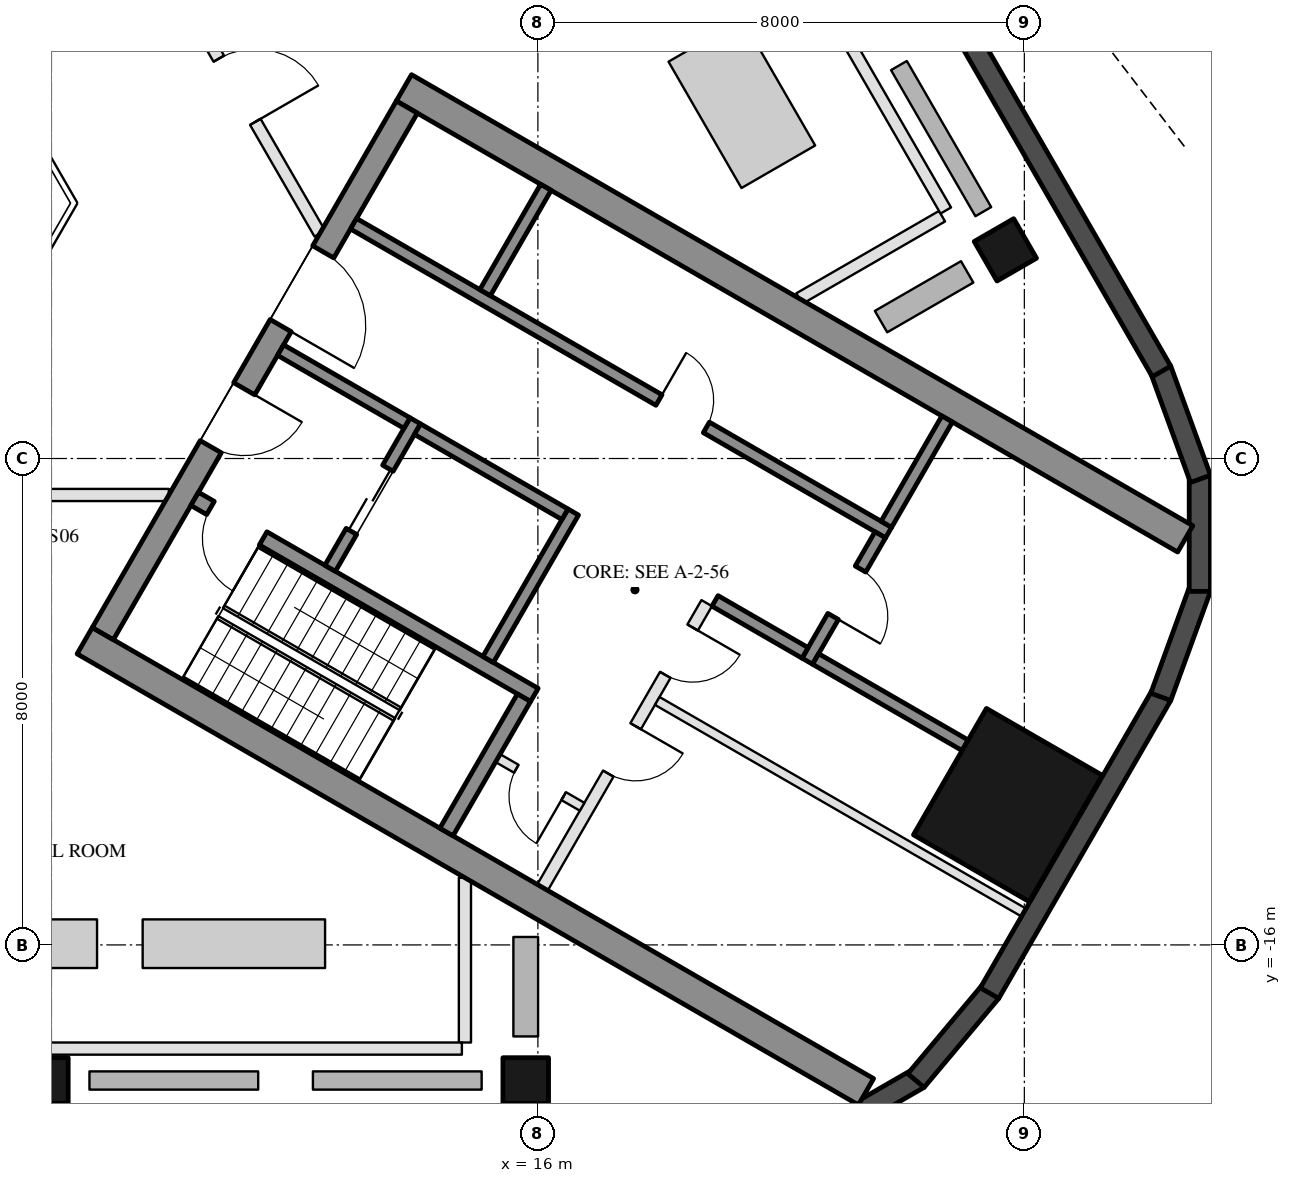
"""IFC4 building model, lengths in metres.
Left out: names, types, materials, properties, quantities, classifications, styles, units other than length and angle.
Written with IfcOpenShell. Run it as: python <this file> out.ifc"""

import sys

from ifc_helpers import new_model, si_unit, direction, frame, frame_2d, origin, origin_2d, place, context, subcontext, project, spatial, rectangle, hollow_rectangle, extrude, element, fill, save


model = new_model("IFC4")
c1 = context("Model", 3, precision=1e-05, world=origin(), true_north=direction((0.0, 1.0)))
c2 = subcontext(c1, "Body", "Model", "MODEL_VIEW")
j1 = project(units=[si_unit("LENGTHUNIT", "METRE"), si_unit("PLANEANGLEUNIT", "RADIAN")], contexts=[c1])
p1 = place(None, origin())
s1 = spatial("IfcSite", under=j1, at=p1, CompositionType="ELEMENT")
p2 = place(p1, origin())
s2 = spatial("IfcBuilding", under=s1, at=p2, CompositionType="ELEMENT")
p3 = place(p2, frame((0.0, 0.0, 242.2)))
s3 = spatial("IfcBuildingStorey", under=s2, at=p3, CompositionType="ELEMENT", Elevation=242.2)
for number, where, z_axis, x_axis in (
    (1, (7.9, -18.23, 0.0), (0.0, 0.0, 1.0), (-1.0, 0.0, 0.0)),
    (2, (15.8, -18.23, 0.0), (0.0, 0.0, 1.0), (-1.0, 0.0, 0.0)),
    (3, (23.688, -4.568, 0.0), (0.0, 0.0, 1.0), (-0.5, 0.866, 0.0)),
):
    element("IfcColumn", number, at=place(p3, frame(where, z_axis=z_axis, x_axis=x_axis)), inside=s3, PredefinedType="COLUMN", context=c2, shape_type="SweptSolid", body=[
        extrude(hollow_rectangle(XDim=0.75, YDim=0.75, WallThickness=0.035, at=origin_2d()), origin(), (0.0, 0.0, 1.0), 4.5),
    ])
p4 = place(p3, frame((23.729, -13.7, 0.0), z_axis=(0.0, 0.0, 1.0), x_axis=(0.5, 0.866025403784, 0.0)))
e4 = element("IfcColumn", 4, at=p4, inside=s3, PredefinedType="COLUMN", context=c2, shape_type="SweptSolid", body=[
    extrude(hollow_rectangle(XDim=2.4, YDim=2.2, WallThickness=0.06, at=origin_2d()), origin(), (0.0, 0.0, 1.0), 4.5),
])
for number, where, z_axis, x_axis in (
    (5, (20.61, -19.147, 0.0), (0.0, 0.0, 1.0), (0.866, 0.5, 0.0)),
    (6, (22.217, -18.231, 0.0), (0.0, 0.0, 1.0), (0.643, 0.766, 0.0)),
):
    element("IfcWall", number, at=place(p3, frame(where, z_axis=z_axis, x_axis=x_axis)), inside=s3, PredefinedType="SOLIDWALL", context=c2, shape_type="SweptSolid", body=[
        extrude(rectangle(XDim=1.91, YDim=0.35, at=frame_2d((0.955, 0.0))), origin(), (0.0, 0.0, 1.0), 4.35),
    ])
p5 = place(p3, frame((23.427, -16.792, 0.0), z_axis=(0.0, 0.0, 1.0), x_axis=(0.499986410639, 0.866033249463, 0.0)))
e7 = element("IfcWall", 7, at=p5, inside=s3, PredefinedType="SOLIDWALL", context=c2, shape_type="SweptSolid", body=[
    extrude(rectangle(XDim=5.658, YDim=0.35, at=frame_2d((2.829, 0.0))), origin(), (0.0, 0.0, 1.0), 4.35),
])
for number, where, z_axis, x_axis in (
    (8, (26.244, -11.92, 0.0), (0.0, 0.0, 1.0), (0.342, 0.94, 0.0)),
    (9, (26.886, -10.185, 0.0), (0.0, 0.0, 1.0), (0.0, 1.0, 0.0)),
    (10, (26.897, -8.335, 0.0), (0.0, 0.0, 1.0), (-0.342, 0.94, 0.0)),
):
    element("IfcWall", number, at=place(p3, frame(where, z_axis=z_axis, x_axis=x_axis)), inside=s3, PredefinedType="SOLIDWALL", context=c2, shape_type="SweptSolid", body=[
        extrude(rectangle(XDim=1.91, YDim=0.35, at=frame_2d((0.955, 0.0))), origin(), (0.0, 0.0, 1.0), 4.35),
    ])
p6 = place(p3, frame((26.256, -6.567, 0.0), z_axis=(0.0, 0.0, 1.0), x_axis=(-0.499998380999, 0.866026338513, 0.0)))
e11 = element("IfcWall", 11, at=p6, inside=s3, PredefinedType="SOLIDWALL", context=c2, shape_type="SweptSolid", body=[
    extrude(rectangle(XDim=37.631, YDim=0.35, at=frame_2d((18.816, 0.0))), origin(), (0.0, 0.0, 1.0), 4.35),
])
for number, where, z_axis, x_axis in (
    (12, (8.547, -10.997, 0.0), (0.0, 0.0, 1.0), (0.866, -0.5, 0.0)),
    (13, (13.797, -1.903, 0.0), (0.0, 0.0, 1.0), (0.866, -0.5, 0.0)),
):
    element("IfcWall", number, at=place(p3, frame(where, z_axis=z_axis, x_axis=x_axis)), inside=s3, PredefinedType="SHEAR", context=c2, shape_type="SweptSolid", body=[
        extrude(rectangle(XDim=14.837, YDim=0.5, at=frame_2d((7.418, 0.0))), origin(), (0.0, 0.0, 1.0), 4.3),
    ])
p7 = place(p3, frame((8.845, -10.88, 0.0), z_axis=(0.0, 0.0, 1.0), x_axis=(0.500004234368, 0.866022959057, 0.0)))
e14 = element("IfcWall", 14, at=p7, inside=s3, PredefinedType="SHEAR", context=c2, shape_type="SweptSolid", body=[
    extrude(rectangle(XDim=10.0, YDim=0.4, at=frame_2d((5.0, 0.0))), origin(), (0.0, 0.0, 1.0), 4.3),
])
p8 = place(p7, frame((3.55, 0.0, 0.0)))
e15 = element("IfcOpeningElement", 15, at=p8, cuts=e14, PredefinedType="OPENING", context=c2, shape_type="SweptSolid", body=[
    extrude(rectangle(XDim=1.1, YDim=2.1, at=frame_2d((0.55, 1.05))), frame((0.0, 0.21, 0.0), z_axis=(0.0, -1.0, 0.0), x_axis=(1.0, 0.0, 0.0)), (0.0, 0.0, 1.0), 0.42),
])
p9 = place(p7, frame((5.85, 0.0, 0.0)))
e16 = element("IfcOpeningElement", 16, at=p9, cuts=e14, PredefinedType="OPENING", context=c2, shape_type="SweptSolid", body=[
    extrude(rectangle(XDim=1.4, YDim=2.1, at=frame_2d((0.7, 1.05))), frame((0.0, 0.21, 0.0), z_axis=(0.0, -1.0, 0.0), x_axis=(1.0, 0.0, 0.0)), (0.0, 0.0, 1.0), 0.42),
])
p10 = place(p3, frame((10.356, -8.664, 0.0), z_axis=(0.0, 0.0, 1.0), x_axis=(0.866028629588, -0.499994412703, 0.0)))
e17 = element("IfcWall", 17, at=p10, inside=s3, PredefinedType="SHEAR", context=c2, shape_type="SweptSolid", body=[
    extrude(rectangle(XDim=6.45, YDim=0.25, at=frame_2d((3.225, 0.0))), origin(), (0.0, 0.0, 1.0), 4.3),
])
p11 = place(p10, frame((0.3, 0.0, 0.0)))
e18 = element("IfcOpeningElement", 18, at=p11, cuts=e17, PredefinedType="OPENING", context=c2, shape_type="SweptSolid", body=[
    extrude(rectangle(XDim=1.0, YDim=2.1, at=frame_2d((0.5, 1.05))), frame((0.0, 0.135, 0.0), z_axis=(0.0, -1.0, 0.0), x_axis=(1.0, 0.0, 0.0)), (0.0, 0.0, 1.0), 0.27),
])
p12 = place(p3, frame((14.496, -14.143, 0.0), z_axis=(0.0, 0.0, 1.0), x_axis=(0.500062241894, 0.865989465428, 0.0)))
e19 = element("IfcWall", 19, at=p12, inside=s3, PredefinedType="SHEAR", context=c2, shape_type="SweptSolid", body=[
    extrude(rectangle(XDim=2.55, YDim=0.25, at=frame_2d((1.275, 0.0))), origin(), (0.0, 0.0, 1.0), 4.3),
])
p13 = place(p3, frame((15.181, -11.305, 0.0), z_axis=(0.0, 0.0, 1.0), x_axis=(0.49994636267, 0.866056369097, 0.0)))
e20 = element("IfcWall", 20, at=p13, inside=s3, PredefinedType="SHEAR", context=c2, shape_type="SweptSolid", body=[
    extrude(rectangle(XDim=2.8, YDim=0.2, at=frame_2d((1.4, 0.0))), origin(), (0.0, 0.0, 1.0), 4.3),
])
p14 = place(p3, frame((12.583, -9.805, 0.0), z_axis=(0.0, 0.0, 1.0), x_axis=(0.49994636267, 0.866056369097, 0.0)))
e21 = element("IfcWall", 21, at=p14, inside=s3, PredefinedType="SHEAR", context=c2, shape_type="SweptSolid", body=[
    extrude(rectangle(XDim=2.8, YDim=0.2, at=frame_2d((1.4, 0.0))), origin(), (0.0, 0.0, 1.0), 4.3),
])
p15 = place(p14, frame((0.7, 0.0, 0.0)))
e22 = element("IfcOpeningElement", 22, at=p15, cuts=e21, PredefinedType="OPENING", context=c2, shape_type="SweptSolid", body=[
    extrude(rectangle(XDim=1.2, YDim=2.1, at=frame_2d((0.6, 1.05))), frame((0.0, 0.11, 0.0), z_axis=(0.0, -1.0, 0.0), x_axis=(1.0, 0.0, 0.0)), (0.0, 0.0, 1.0), 0.22),
])
p16 = place(p3, frame((11.768, -6.217, 0.0), z_axis=(0.0, 0.0, 1.0), x_axis=(0.866050077142, -0.499957262057, 0.0)))
e23 = element("IfcWall", 23, at=p16, inside=s3, PredefinedType="SHEAR", context=c2, shape_type="SweptSolid", body=[
    extrude(rectangle(XDim=2.4, YDim=0.2, at=frame_2d((1.2, 0.0))), origin(), (0.0, 0.0, 1.0), 4.3),
])
p17 = place(p3, frame((14.02, -7.517, 0.0), z_axis=(0.0, 0.0, 1.0), x_axis=(0.866034573852, -0.49998411664, 0.0)))
e24 = element("IfcWall", 24, at=p17, inside=s3, PredefinedType="SHEAR", context=c2, shape_type="SweptSolid", body=[
    extrude(rectangle(XDim=2.8, YDim=0.2, at=frame_2d((1.4, 0.0))), origin(), (0.0, 0.0, 1.0), 4.3),
])
p18 = place(p3, frame((12.968, -4.138, 0.0), z_axis=(0.0, 0.0, 1.0), x_axis=(0.866028328073, -0.49999493495, 0.0)))
e25 = element("IfcWall", 25, at=p18, inside=s3, PredefinedType="SHEAR", context=c2, shape_type="SweptSolid", body=[
    extrude(rectangle(XDim=10.16, YDim=0.2, at=frame_2d((5.08, 0.0))), origin(), (0.0, 0.0, 1.0), 4.3),
])
p19 = place(p18, frame((5.8, 0.0, 0.0)))
e26 = element("IfcOpeningElement", 26, at=p19, cuts=e25, PredefinedType="OPENING", context=c2, shape_type="SweptSolid", body=[
    extrude(rectangle(XDim=0.9, YDim=2.1, at=frame_2d((0.45, 1.05))), frame((0.0, 0.11, 0.0), z_axis=(0.0, -1.0, 0.0), x_axis=(1.0, 0.0, 0.0)), (0.0, 0.0, 1.0), 0.22),
])
p20 = place(p3, frame((20.43, -11.333, 0.0), z_axis=(0.0, 0.0, 1.0), x_axis=(0.500001309137, 0.866024647952, 0.0)))
e27 = element("IfcWall", 27, at=p20, inside=s3, PredefinedType="SHEAR", context=c2, shape_type="SweptSolid", body=[
    extrude(rectangle(XDim=2.4, YDim=0.2, at=frame_2d((1.2, 0.0))), origin(), (0.0, 0.0, 1.0), 4.3),
])
p21 = place(p20, frame((0.85, 0.0, 0.0)))
e28 = element("IfcOpeningElement", 28, at=p21, cuts=e27, PredefinedType="OPENING", context=c2, shape_type="SweptSolid", body=[
    extrude(rectangle(XDim=0.9, YDim=2.1, at=frame_2d((0.45, 1.05))), frame((0.0, 0.11, 0.0), z_axis=(0.0, -1.0, 0.0), x_axis=(1.0, 0.0, 0.0)), (0.0, 0.0, 1.0), 0.22),
])
p22 = place(p3, frame((18.913, -10.342, 0.0), z_axis=(0.0, 0.0, 1.0), x_axis=(0.866038183914, -0.499977863513, 0.0)))
e29 = element("IfcWall", 29, at=p22, inside=s3, PredefinedType="SHEAR", context=c2, shape_type="SweptSolid", body=[
    extrude(rectangle(XDim=1.71, YDim=0.2, at=frame_2d((0.855, 0.0))), origin(), (0.0, 0.0, 1.0), 4.3),
])
for number, where, z_axis, x_axis in (
    (30, (15.131, -5.272, 0.0), (0.0, 0.0, 1.0), (0.5, 0.866, 0.0)),
    (31, (21.73, -9.082, 0.0), (0.0, 0.0, 1.0), (0.5, 0.866, 0.0)),
):
    element("IfcWall", number, at=place(p3, frame(where, z_axis=z_axis, x_axis=x_axis)), inside=s3, PredefinedType="SHEAR", context=c2, shape_type="SweptSolid", body=[
        extrude(rectangle(XDim=2.0, YDim=0.2, at=frame_2d((1.0, 0.0))), origin(), (0.0, 0.0, 1.0), 4.3),
    ])
p23 = place(p3, frame((20.567, -11.297, 0.0), z_axis=(0.0, 0.0, 1.0), x_axis=(0.866055327414, -0.49994816717, 0.0)))
e32 = element("IfcWall", 32, at=p23, inside=s3, PredefinedType="SHEAR", context=c2, shape_type="SweptSolid", body=[
    extrude(rectangle(XDim=2.84, YDim=0.2, at=frame_2d((1.42, 0.0))), origin(), (0.0, 0.0, 1.0), 4.3),
])
p24 = place(p3, frame((16.076, -15.055, 0.0), z_axis=(0.0, 0.0, 1.0), x_axis=(0.499995103361, 0.866028230842, 0.0)))
e33 = element("IfcWall", 33, at=p24, inside=s3, PredefinedType="PARTITIONING", context=c2, shape_type="SweptSolid", body=[
    extrude(rectangle(XDim=5.4, YDim=0.2, at=frame_2d((2.7, 0.0))), origin(), (0.0, 0.0, 1.0), 4.3),
])
p25 = place(p24, frame((2.163, 0.0, 0.0)))
e34 = element("IfcOpeningElement", 34, at=p25, cuts=e33, PredefinedType="OPENING", context=c2, shape_type="SweptSolid", body=[
    extrude(rectangle(XDim=0.9, YDim=2.1, at=frame_2d((0.45, 1.05))), frame((0.0, 0.11, 0.0), z_axis=(0.0, -1.0, 0.0), x_axis=(1.0, 0.0, 0.0)), (0.0, 0.0, 1.0), 0.22),
])
p26 = place(p24, frame((4.038, 0.0, 0.0)))
e35 = element("IfcOpeningElement", 35, at=p26, cuts=e33, PredefinedType="OPENING", context=c2, shape_type="SweptSolid", body=[
    extrude(rectangle(XDim=0.9, YDim=2.1, at=frame_2d((0.45, 1.05))), frame((0.0, 0.11, 0.0), z_axis=(0.0, -1.0, 0.0), x_axis=(1.0, 0.0, 0.0)), (0.0, 0.0, 1.0), 0.22),
])
p27 = place(p3, frame((15.342, -12.928, 0.0), z_axis=(0.0, 0.0, 1.0), x_axis=(0.865989903783, -0.500061482766, 0.0)))
e36 = element("IfcWall", 36, at=p27, inside=s3, PredefinedType="PARTITIONING", context=c2, shape_type="SweptSolid", body=[
    extrude(rectangle(XDim=1.6, YDim=0.15, at=frame_2d((0.8, 0.0))), origin(), (0.0, 0.0, 1.0), 4.3),
])
p28 = place(p27, frame((0.35, 0.0, 0.0)))
e37 = element("IfcOpeningElement", 37, at=p28, cuts=e36, PredefinedType="OPENING", context=c2, shape_type="SweptSolid", body=[
    extrude(rectangle(XDim=0.9, YDim=2.1, at=frame_2d((0.45, 1.05))), frame((0.0, 0.085, 0.0), z_axis=(0.0, -1.0, 0.0), x_axis=(1.0, 0.0, 0.0)), (0.0, 0.0, 1.0), 0.17),
])
p29 = place(p3, frame((17.963, -11.987, 0.0), z_axis=(0.0, 0.0, 1.0), x_axis=(0.866016523273, -0.500015381182, 0.0)))
e38 = element("IfcWall", 38, at=p29, inside=s3, PredefinedType="PARTITIONING", context=c2, shape_type="SweptSolid", body=[
    extrude(rectangle(XDim=6.95, YDim=0.15, at=frame_2d((3.475, 0.0))), origin(), (0.0, 0.0, 1.0), 4.3),
])
p30 = place(p3, frame((14.8, -17.605, 0.0), z_axis=(0.0, 0.0, 1.0), x_axis=(0.0, 1.0, 0.0)))
e39 = element("IfcWall", 39, at=p30, inside=s3, PredefinedType="PARTITIONING", context=c2, shape_type="SweptSolid", body=[
    extrude(rectangle(XDim=2.709, YDim=0.2, at=frame_2d((1.355, 0.0))), origin(), (0.0, 0.0, 1.0), 4.35),
])
p31 = place(p3, frame((-14.75, -17.705, 0.0), z_axis=(0.0, 0.0, 1.0), x_axis=(1.0, 0.0, 0.0)))
e40 = element("IfcWall", 40, at=p31, inside=s3, PredefinedType="PARTITIONING", context=c2, shape_type="SweptSolid", body=[
    extrude(rectangle(XDim=29.5, YDim=0.2, at=frame_2d((14.75, 0.0))), origin(), (0.0, 0.0, 1.0), 3.75),
])
p32 = place(p3, frame((-9.93, -8.6, 0.0), z_axis=(0.0, 0.0, 1.0), x_axis=(1.0, 0.0, 0.0)))
e41 = element("IfcWall", 41, at=p32, inside=s3, PredefinedType="PARTITIONING", context=c2, shape_type="SweptSolid", body=[
    extrude(rectangle(XDim=19.861, YDim=0.2, at=frame_2d((9.93, 0.0))), origin(), (0.0, 0.0, 1.0), 3.75),
])
p33 = place(p32, frame((2.871, 0.0, 0.0)))
e42 = element("IfcOpeningElement", 42, at=p33, cuts=e41, PredefinedType="OPENING", context=c2, shape_type="SweptSolid", body=[
    extrude(rectangle(XDim=1.2, YDim=2.1, at=frame_2d((0.6, 1.05))), frame((0.0, 0.11, 0.0), z_axis=(0.0, -1.0, 0.0), x_axis=(1.0, 0.0, 0.0)), (0.0, 0.0, 1.0), 0.22),
])
p34 = place(p32, frame((10.081, 0.0, 0.0)))
e43 = element("IfcOpeningElement", 43, at=p34, cuts=e41, PredefinedType="OPENING", context=c2, shape_type="SweptSolid", body=[
    extrude(rectangle(XDim=1.2, YDim=2.1, at=frame_2d((0.6, 1.05))), frame((0.0, 0.11, 0.0), z_axis=(0.0, -1.0, 0.0), x_axis=(1.0, 0.0, 0.0)), (0.0, 0.0, 1.0), 0.22),
])
p35 = place(p32, frame((16.54, 0.0, 0.0)))
e44 = element("IfcOpeningElement", 44, at=p35, cuts=e41, PredefinedType="OPENING", context=c2, shape_type="SweptSolid", body=[
    extrude(rectangle(XDim=1.2, YDim=2.1, at=frame_2d((0.6, 1.05))), frame((0.0, 0.11, 0.0), z_axis=(0.0, -1.0, 0.0), x_axis=(1.0, 0.0, 0.0)), (0.0, 0.0, 1.0), 0.22),
])
p36 = place(p3, frame((22.646, -4.015, 0.0), z_axis=(0.0, 0.0, 1.0), x_axis=(-0.866044551023, -0.499966834543, 0.0)))
e45 = element("IfcWall", 45, at=p36, inside=s3, PredefinedType="PARTITIONING", context=c2, shape_type="SweptSolid", body=[
    extrude(rectangle(XDim=2.71, YDim=0.2, at=frame_2d((1.355, 0.0))), origin(), (0.0, 0.0, 1.0), 4.35),
])
p37 = place(p3, frame((22.708, -3.921, 0.0), z_axis=(0.0, 0.0, 1.0), x_axis=(-0.499998500593, 0.866026269466, 0.0)))
e46 = element("IfcWall", 46, at=p37, inside=s3, PredefinedType="PARTITIONING", context=c2, shape_type="SweptSolid", body=[
    extrude(rectangle(XDim=29.5, YDim=0.2, at=frame_2d((14.75, 0.0))), origin(), (0.0, 0.0, 1.0), 3.75),
])
p38 = place(p3, frame((12.413, -4.3, 0.0), z_axis=(0.0, 0.0, 1.0), x_axis=(-0.50000478328, 0.866022642139, 0.0)))
e47 = element("IfcWall", 47, at=p38, inside=s3, PredefinedType="PARTITIONING", context=c2, shape_type="SweptSolid", body=[
    extrude(rectangle(XDim=19.861, YDim=0.2, at=frame_2d((9.931, 0.0))), origin(), (0.0, 0.0, 1.0), 3.75),
])
p39 = place(p38, frame((2.121, 0.0, 0.0)))
e48 = element("IfcOpeningElement", 48, at=p39, cuts=e47, PredefinedType="OPENING", context=c2, shape_type="SweptSolid", body=[
    extrude(rectangle(XDim=1.2, YDim=2.1, at=frame_2d((0.6, 1.05))), frame((0.0, 0.11, 0.0), z_axis=(0.0, -1.0, 0.0), x_axis=(1.0, 0.0, 0.0)), (0.0, 0.0, 1.0), 0.22),
])
p40 = place(p38, frame((8.831, 0.0, 0.0)))
e49 = element("IfcOpeningElement", 49, at=p40, cuts=e47, PredefinedType="OPENING", context=c2, shape_type="SweptSolid", body=[
    extrude(rectangle(XDim=1.2, YDim=2.1, at=frame_2d((0.6, 1.05))), frame((0.0, 0.11, 0.0), z_axis=(0.0, -1.0, 0.0), x_axis=(1.0, 0.0, 0.0)), (0.0, 0.0, 1.0), 0.22),
])
p41 = place(p38, frame((16.04, 0.0, 0.0)))
e50 = element("IfcOpeningElement", 50, at=p41, cuts=e47, PredefinedType="OPENING", context=c2, shape_type="SweptSolid", body=[
    extrude(rectangle(XDim=1.2, YDim=2.1, at=frame_2d((0.6, 1.05))), frame((0.0, 0.11, 0.0), z_axis=(0.0, -1.0, 0.0), x_axis=(1.0, 0.0, 0.0)), (0.0, 0.0, 1.0), 0.22),
])
p42 = place(p15, origin())
e51 = element("IfcDoor", 51, at=p42, inside=s3, OperationType="DOUBLE_DOOR_SLIDING", PredefinedType="DOOR", context=c2, shape_type="SweptSolid", body=[
    extrude(rectangle(XDim=1.2, YDim=2.1, at=frame_2d((0.6, 1.05))), frame((0.0, 0.025, 0.0), z_axis=(0.0, -1.0, 0.0), x_axis=(1.0, 0.0, 0.0)), (0.0, 0.0, 1.0), 0.05),
])
fill(e22, e51)
p43 = place(p28, frame((0.9, 0.0, 0.0), z_axis=(0.0, 0.0, 1.0), x_axis=(-1.0, 0.0, 0.0)))
e52 = element("IfcDoor", 52, at=p43, inside=s3, OperationType="SINGLE_SWING_LEFT", PredefinedType="DOOR", context=c2, shape_type="SweptSolid", body=[
    extrude(rectangle(XDim=0.9, YDim=2.1, at=frame_2d((0.45, 1.05))), frame((0.0, 0.025, 0.0), z_axis=(0.0, -1.0, 0.0), x_axis=(1.0, 0.0, 0.0)), (0.0, 0.0, 1.0), 0.05),
])
fill(e37, e52)
p44 = place(p19, origin())
e53 = element("IfcDoor", 53, at=p44, inside=s3, OperationType="SINGLE_SWING_LEFT", PredefinedType="DOOR", context=c2, shape_type="SweptSolid", body=[
    extrude(rectangle(XDim=0.9, YDim=2.1, at=frame_2d((0.45, 1.05))), frame((0.0, 0.025, 0.0), z_axis=(0.0, -1.0, 0.0), x_axis=(1.0, 0.0, 0.0)), (0.0, 0.0, 1.0), 0.05),
])
fill(e26, e53)
p45 = place(p21, frame((0.9, 0.0, 0.0), z_axis=(0.0, 0.0, 1.0), x_axis=(-1.0, 0.0, 0.0)))
e54 = element("IfcDoor", 54, at=p45, inside=s3, OperationType="SINGLE_SWING_RIGHT", PredefinedType="DOOR", context=c2, shape_type="SweptSolid", body=[
    extrude(rectangle(XDim=0.9, YDim=2.1, at=frame_2d((0.45, 1.05))), frame((0.0, 0.025, 0.0), z_axis=(0.0, -1.0, 0.0), x_axis=(1.0, 0.0, 0.0)), (0.0, 0.0, 1.0), 0.05),
])
fill(e28, e54)
p46 = place(p25, frame((0.9, 0.0, 0.0), z_axis=(0.0, 0.0, 1.0), x_axis=(-1.0, 0.0, 0.0)))
e55 = element("IfcDoor", 55, at=p46, inside=s3, OperationType="SINGLE_SWING_LEFT", PredefinedType="DOOR", context=c2, shape_type="SweptSolid", body=[
    extrude(rectangle(XDim=0.9, YDim=2.1, at=frame_2d((0.45, 1.05))), frame((0.0, 0.025, 0.0), z_axis=(0.0, -1.0, 0.0), x_axis=(1.0, 0.0, 0.0)), (0.0, 0.0, 1.0), 0.05),
])
fill(e34, e55)
p47 = place(p26, frame((0.9, 0.0, 0.0), z_axis=(0.0, 0.0, 1.0), x_axis=(-1.0, 0.0, 0.0)))
e56 = element("IfcDoor", 56, at=p47, inside=s3, OperationType="SINGLE_SWING_LEFT", PredefinedType="DOOR", context=c2, shape_type="SweptSolid", body=[
    extrude(rectangle(XDim=0.9, YDim=2.1, at=frame_2d((0.45, 1.05))), frame((0.0, 0.025, 0.0), z_axis=(0.0, -1.0, 0.0), x_axis=(1.0, 0.0, 0.0)), (0.0, 0.0, 1.0), 0.05),
])
fill(e35, e56)
p48 = place(p8, frame((1.1, 0.0, 0.0), z_axis=(0.0, 0.0, 1.0), x_axis=(-1.0, 0.0, 0.0)))
e57 = element("IfcDoor", 57, at=p48, inside=s3, OperationType="SINGLE_SWING_LEFT", PredefinedType="DOOR", context=c2, shape_type="SweptSolid", body=[
    extrude(rectangle(XDim=1.1, YDim=2.1, at=frame_2d((0.55, 1.05))), frame((0.0, 0.025, 0.0), z_axis=(0.0, -1.0, 0.0), x_axis=(1.0, 0.0, 0.0)), (0.0, 0.0, 1.0), 0.05),
])
fill(e15, e57)
p49 = place(p9, frame((1.4, 0.0, 0.0), z_axis=(0.0, 0.0, 1.0), x_axis=(-1.0, 0.0, 0.0)))
e58 = element("IfcDoor", 58, at=p49, inside=s3, OperationType="DOUBLE_DOOR_SINGLE_SWING", PredefinedType="DOOR", context=c2, shape_type="SweptSolid", body=[
    extrude(rectangle(XDim=1.4, YDim=2.1, at=frame_2d((0.7, 1.05))), frame((0.0, 0.025, 0.0), z_axis=(0.0, -1.0, 0.0), x_axis=(1.0, 0.0, 0.0)), (0.0, 0.0, 1.0), 0.05),
])
fill(e16, e58)
p50 = place(p11, frame((1.0, 0.0, 0.0), z_axis=(0.0, 0.0, 1.0), x_axis=(-1.0, 0.0, 0.0)))
e59 = element("IfcDoor", 59, at=p50, inside=s3, OperationType="SINGLE_SWING_LEFT", PredefinedType="DOOR", context=c2, shape_type="SweptSolid", body=[
    extrude(rectangle(XDim=1.0, YDim=2.1, at=frame_2d((0.5, 1.05))), frame((0.0, 0.025, 0.0), z_axis=(0.0, -1.0, 0.0), x_axis=(1.0, 0.0, 0.0)), (0.0, 0.0, 1.0), 0.05),
])
fill(e18, e59)
p51 = place(p39, frame((1.2, 0.0, 0.0), z_axis=(0.0, 0.0, 1.0), x_axis=(-1.0, 0.0, 0.0)))
e60 = element("IfcDoor", 60, at=p51, inside=s3, OperationType="SINGLE_SWING_RIGHT", PredefinedType="DOOR", context=c2, shape_type="SweptSolid", body=[
    extrude(rectangle(XDim=1.2, YDim=2.1, at=frame_2d((0.6, 1.05))), frame((0.0, 0.025, 0.0), z_axis=(0.0, -1.0, 0.0), x_axis=(1.0, 0.0, 0.0)), (0.0, 0.0, 1.0), 0.05),
])
fill(e48, e60)
save(model, sys.argv[1])
